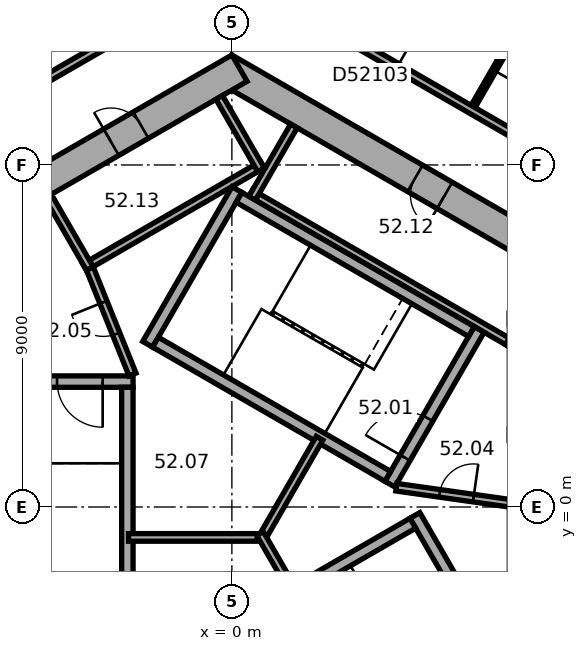
"""IFC4 building model, lengths in metres.
Left out: names, types, materials, properties, quantities, classifications, styles, units other than length and angle.
Written with IfcOpenShell. Run it as: python <this file> out.ifc"""

import sys

from ifc_helpers import new_model, si_unit, direction, frame, frame_2d, origin, place, context, subcontext, project, spatial, rectangle, extrude, element, fill, save


model = new_model("IFC4")
c1 = context("Model", 3, precision=1e-05, world=origin(), true_north=direction((0.0, 1.0)))
c2 = subcontext(c1, "Body", "Model", "MODEL_VIEW")
j1 = project(units=[si_unit("LENGTHUNIT", "METRE"), si_unit("PLANEANGLEUNIT", "RADIAN")], contexts=[c1])
p1 = place(None, origin())
s1 = spatial("IfcSite", under=j1, at=p1, CompositionType="ELEMENT")
p2 = place(p1, origin())
s2 = spatial("IfcBuilding", under=s1, at=p2, CompositionType="ELEMENT")
p3 = place(p2, frame((0.0, 0.0, 210.6)))
s3 = spatial("IfcBuildingStorey", under=s2, at=p3, CompositionType="ELEMENT", Elevation=210.6)
p4 = place(p3, frame((10.1, 5.6, 0.0), z_axis=(0.0, 0.0, 1.0), x_axis=(-0.866023897231, 0.500002609418, 0.0)))
e1 = element("IfcWall", 1, at=p4, inside=s3, PredefinedType="SHEAR", context=c2, shape_type="SweptSolid", body=[
    extrude(rectangle(XDim=11.894, YDim=0.8, at=frame_2d((5.947, 0.0))), origin(), (0.0, 0.0, 1.0), 3.7),
])
p5 = place(p4, frame((5.197, 0.0, 0.0)))
e2 = element("IfcOpeningElement", 2, at=p5, cuts=e1, PredefinedType="OPENING", context=c2, shape_type="SweptSolid", body=[
    extrude(rectangle(XDim=0.9, YDim=2.1, at=frame_2d((0.45, 1.05))), frame((0.0, 0.41, 0.0), z_axis=(0.0, -1.0, 0.0), x_axis=(1.0, 0.0, 0.0)), (0.0, 0.0, 1.0), 0.82),
])
p6 = place(p3, frame((0.2, 11.547, 0.0), z_axis=(0.0, 0.0, 1.0), x_axis=(-0.866023897231, -0.500002609418, 0.0)))
e3 = element("IfcWall", 3, at=p6, inside=s3, PredefinedType="SHEAR", context=c2, shape_type="SweptSolid", body=[
    extrude(rectangle(XDim=11.894, YDim=0.8, at=frame_2d((5.947, 0.0))), origin(), (0.0, 0.0, 1.0), 3.7),
])
p7 = place(p6, frame((6.147, 0.0, 0.0)))
e4 = element("IfcOpeningElement", 4, at=p7, cuts=e3, PredefinedType="OPENING", context=c2, shape_type="SweptSolid", body=[
    extrude(rectangle(XDim=1.5, YDim=2.1, at=frame_2d((0.75, 1.05))), frame((0.0, 0.41, 0.0), z_axis=(0.0, -1.0, 0.0), x_axis=(1.0, 0.0, 0.0)), (0.0, 0.0, 1.0), 0.82),
])
p8 = place(p6, frame((2.997, 0.0, 0.0)))
e5 = element("IfcOpeningElement", 5, at=p8, cuts=e3, PredefinedType="OPENING", context=c2, shape_type="SweptSolid", body=[
    extrude(rectangle(XDim=0.9, YDim=2.1, at=frame_2d((0.45, 1.05))), frame((0.0, 0.41, 0.0), z_axis=(0.0, -1.0, 0.0), x_axis=(1.0, 0.0, 0.0)), (0.0, 0.0, 1.0), 0.82),
])
p9 = place(p3, frame((7.424, 4.259, 0.0), z_axis=(0.0, 0.0, 1.0), x_axis=(-0.866026010844, 0.49999894854, 0.0)))
e6 = element("IfcWall", 6, at=p9, inside=s3, PredefinedType="PARTITIONING", context=c2, shape_type="SweptSolid", body=[
    extrude(rectangle(XDim=8.0, YDim=0.2, at=frame_2d((4.0, 0.0))), origin(), (0.0, 0.0, 1.0), 3.35),
])
for number, where, z_axis, x_axis in (
    (7, (7.287, 4.222, 0.0), (0.0, 0.0, 1.0), (0.5, 0.866, 0.0)),
    (8, (0.532, 8.122, 0.0), (0.0, 0.0, 1.0), (0.5, 0.866, 0.0)),
):
    element("IfcWall", number, at=place(p3, frame(where, z_axis=z_axis, x_axis=x_axis)), inside=s3, PredefinedType="PARTITIONING", context=c2, shape_type="SweptSolid", body=[
        extrude(rectangle(XDim=2.2, YDim=0.2, at=frame_2d((1.1, 0.0))), origin(), (0.0, 0.0, 1.0), 3.35),
    ])
p10 = place(p3, frame((0.803, 9.009, 0.0), z_axis=(0.0, 0.0, 1.0), x_axis=(-0.866028230842, -0.499995103361, 0.0)))
e9 = element("IfcWall", 9, at=p10, inside=s3, PredefinedType="PARTITIONING", context=c2, shape_type="SweptSolid", body=[
    extrude(rectangle(XDim=5.4, YDim=0.2, at=frame_2d((2.7, 0.0))), origin(), (0.0, 0.0, 1.0), 3.35),
])
p11 = place(p3, frame((0.767, 8.872, 0.0), z_axis=(0.0, 0.0, 1.0), x_axis=(-0.499994660107, 0.866028486751, 0.0)))
e10 = element("IfcWall", 10, at=p11, inside=s3, PredefinedType="PARTITIONING", context=c2, shape_type="SweptSolid", body=[
    extrude(rectangle(XDim=2.2, YDim=0.2, at=frame_2d((1.1, 0.0))), origin(), (0.0, 0.0, 1.0), 3.35),
])
p12 = place(p3, frame((-3.737, 6.272, 0.0), z_axis=(0.0, 0.0, 1.0), x_axis=(-0.50002983664, 0.866008176907, 0.0)))
e11 = element("IfcWall", 11, at=p12, inside=s3, PredefinedType="PARTITIONING", context=c2, shape_type="SweptSolid", body=[
    extrude(rectangle(XDim=2.2, YDim=0.2, at=frame_2d((1.1, 0.0))), origin(), (0.0, 0.0, 1.0), 3.35),
])
p13 = place(p3, frame((4.158, 0.602, 0.0), z_axis=(0.0, 0.0, 1.0), x_axis=(0.499977259774, 0.866038532462, 0.0)))
e12 = element("IfcWall", 12, at=p13, inside=s3, PredefinedType="SHEAR", context=c2, shape_type="SweptSolid", body=[
    extrude(rectangle(XDim=4.7, YDim=0.3, at=frame_2d((2.35, 0.0))), origin(), (0.0, 0.0, 1.0), 3.35),
])
p14 = place(p13, frame((0.8, 0.0, 0.0)))
e13 = element("IfcOpeningElement", 13, at=p14, cuts=e12, PredefinedType="OPENING", context=c2, shape_type="SweptSolid", body=[
    extrude(rectangle(XDim=1.2, YDim=2.1, at=frame_2d((0.6, 1.05))), frame((0.0, 0.16, 0.0), z_axis=(0.0, -1.0, 0.0), x_axis=(1.0, 0.0, 0.0)), (0.0, 0.0, 1.0), 0.32),
])
p15 = place(p3, frame((-2.216, 4.282, 0.0), z_axis=(0.0, 0.0, 1.0), x_axis=(0.499977259774, 0.866038532462, 0.0)))
e14 = element("IfcWall", 14, at=p15, inside=s3, PredefinedType="SHEAR", context=c2, shape_type="SweptSolid", body=[
    extrude(rectangle(XDim=4.7, YDim=0.3, at=frame_2d((2.35, 0.0))), origin(), (0.0, 0.0, 1.0), 3.35),
])
for number, where, z_axis, x_axis in (
    (15, (4.103, 0.807, 0.0), (0.0, 0.0, 1.0), (-0.866, 0.5, 0.0)),
    (16, (6.303, 4.617, 0.0), (0.0, 0.0, 1.0), (-0.866, 0.5, 0.0)),
):
    element("IfcWall", number, at=place(p3, frame(where, z_axis=z_axis, x_axis=x_axis)), inside=s3, PredefinedType="SHEAR", context=c2, shape_type="SweptSolid", body=[
        extrude(rectangle(XDim=7.06, YDim=0.3, at=frame_2d((3.53, 0.0))), origin(), (0.0, 0.0, 1.0), 3.35),
    ])
p16 = place(p3, frame((-2.6, 3.3, 0.0), z_axis=(0.0, 0.0, 1.0), x_axis=(-1.0, 0.0, 0.0)))
e17 = element("IfcWall", 17, at=p16, inside=s3, PredefinedType="SHEAR", context=c2, shape_type="SweptSolid", body=[
    extrude(rectangle(XDim=4.7, YDim=0.3, at=frame_2d((2.35, 0.0))), origin(), (0.0, 0.0, 1.0), 3.35),
])
p17 = place(p16, frame((0.8, 0.0, 0.0)))
e18 = element("IfcOpeningElement", 18, at=p17, cuts=e17, PredefinedType="OPENING", context=c2, shape_type="SweptSolid", body=[
    extrude(rectangle(XDim=1.2, YDim=2.1, at=frame_2d((0.6, 1.05))), frame((0.0, 0.16, 0.0), z_axis=(0.0, -1.0, 0.0), x_axis=(1.0, 0.0, 0.0)), (0.0, 0.0, 1.0), 0.32),
])
p18 = place(p3, frame((-2.75, 3.15, 0.0), z_axis=(0.0, 0.0, 1.0), x_axis=(0.0, -1.0, 0.0)))
e19 = element("IfcWall", 19, at=p18, inside=s3, PredefinedType="SHEAR", context=c2, shape_type="SweptSolid", body=[
    extrude(rectangle(XDim=7.06, YDim=0.3, at=frame_2d((3.53, 0.0))), origin(), (0.0, 0.0, 1.0), 3.35),
])
p19 = place(p3, frame((4.816, -0.222, 0.0), z_axis=(0.0, 0.0, 1.0), x_axis=(0.499977259774, -0.866038532462, 0.0)))
e20 = element("IfcWall", 20, at=p19, inside=s3, PredefinedType="SHEAR", context=c2, shape_type="SweptSolid", body=[
    extrude(rectangle(XDim=4.7, YDim=0.3, at=frame_2d((2.35, 0.0))), origin(), (0.0, 0.0, 1.0), 3.35),
])
p20 = place(p3, frame((-1.353, -3.957, 0.0), z_axis=(0.0, 0.0, 1.0), x_axis=(0.866027801685, 0.499995846692, 0.0)))
e21 = element("IfcWall", 21, at=p20, inside=s3, PredefinedType="SHEAR", context=c2, shape_type="SweptSolid", body=[
    extrude(rectangle(XDim=7.06, YDim=0.3, at=frame_2d((3.53, 0.0))), origin(), (0.0, 0.0, 1.0), 3.35),
])
p21 = place(p3, frame((4.327, 0.521, 0.0), z_axis=(0.0, 0.0, 1.0), x_axis=(0.990124376366, -0.14019172346, 0.0)))
e22 = element("IfcWall", 22, at=p21, inside=s3, PredefinedType="PARTITIONING", context=c2, shape_type="SweptSolid", body=[
    extrude(rectangle(XDim=3.002, YDim=0.2, at=frame_2d((1.501, 0.0))), origin(), (0.0, 0.0, 1.0), 3.35),
])
p22 = place(p21, frame((1.15, 0.0, 0.0)))
e23 = element("IfcOpeningElement", 23, at=p22, cuts=e22, PredefinedType="OPENING", context=c2, shape_type="SweptSolid", body=[
    extrude(rectangle(XDim=0.9, YDim=2.1, at=frame_2d((0.45, 1.05))), frame((0.0, 0.11, 0.0), z_axis=(0.0, -1.0, 0.0), x_axis=(1.0, 0.0, 0.0)), (0.0, 0.0, 1.0), 0.22),
])
p23 = place(p3, frame((-2.615, 3.487, 0.0), z_axis=(0.0, 0.0, 1.0), x_axis=(-0.373576831041, 0.92759924068, 0.0)))
e24 = element("IfcWall", 24, at=p23, inside=s3, PredefinedType="PARTITIONING", context=c2, shape_type="SweptSolid", body=[
    extrude(rectangle(XDim=3.002, YDim=0.2, at=frame_2d((1.501, 0.0))), origin(), (0.0, 0.0, 1.0), 3.35),
])
p24 = place(p23, frame((1.15, 0.0, 0.0)))
e25 = element("IfcOpeningElement", 25, at=p24, cuts=e24, PredefinedType="OPENING", context=c2, shape_type="SweptSolid", body=[
    extrude(rectangle(XDim=0.9, YDim=2.1, at=frame_2d((0.45, 1.05))), frame((0.0, 0.11, 0.0), z_axis=(0.0, -1.0, 0.0), x_axis=(1.0, 0.0, 0.0)), (0.0, 0.0, 1.0), 0.22),
])
p25 = place(p3, frame((0.92, -0.8, 0.0), z_axis=(0.0, 0.0, 1.0), x_axis=(-1.0, 0.0, 0.0)))
e26 = element("IfcWall", 26, at=p25, inside=s3, PredefinedType="PARTITIONING", context=c2, shape_type="SweptSolid", body=[
    extrude(rectangle(XDim=3.64, YDim=0.2, at=frame_2d((1.82, 0.0))), origin(), (0.0, 0.0, 1.0), 3.35),
])
p26 = place(p3, frame((0.74, -0.904, 0.0), z_axis=(0.0, 0.0, 1.0), x_axis=(0.500028278809, 0.866009076391, 0.0)))
e27 = element("IfcWall", 27, at=p26, inside=s3, PredefinedType="PARTITIONING", context=c2, shape_type="SweptSolid", body=[
    extrude(rectangle(XDim=3.133, YDim=0.2, at=frame_2d((1.566, 0.0))), origin(), (0.0, 0.0, 1.0), 3.35),
])
p27 = place(p3, frame((0.74, -0.696, 0.0), z_axis=(0.0, 0.0, 1.0), x_axis=(0.499956301907, -0.86605063142, 0.0)))
e28 = element("IfcWall", 28, at=p27, inside=s3, PredefinedType="PARTITIONING", context=c2, shape_type="SweptSolid", body=[
    extrude(rectangle(XDim=1.747, YDim=0.2, at=frame_2d((0.874, 0.0))), origin(), (0.0, 0.0, 1.0), 3.35),
])
p28 = place(p3, frame((-1.167, 13.414, 0.0), z_axis=(0.0, 0.0, 1.0), x_axis=(-0.866023347809, -0.500003561037, 0.0)))
e29 = element("IfcWall", 29, at=p28, inside=s3, PredefinedType="PARTITIONING", context=c2, shape_type="SweptSolid", body=[
    extrude(rectangle(XDim=4.661, YDim=0.2, at=frame_2d((2.331, 0.0))), origin(), (0.0, 0.0, 1.0), 3.35),
])
p29 = place(p3, frame((6.347, 10.539, 0.0), z_axis=(0.0, 0.0, 1.0), x_axis=(0.499933790963, 0.866063626216, 0.0)))
e30 = element("IfcWall", 30, at=p29, inside=s3, PredefinedType="PARTITIONING", context=c2, shape_type="SweptSolid", body=[
    extrude(rectangle(XDim=3.1, YDim=0.12, at=frame_2d((1.55, 0.0))), origin(), (0.0, 0.0, 1.0), 3.35),
])
p30 = place(p29, frame((1.1, 0.0, 0.0)))
e31 = element("IfcOpeningElement", 31, at=p30, cuts=e30, PredefinedType="OPENING", context=c2, shape_type="SweptSolid", body=[
    extrude(rectangle(XDim=0.9, YDim=2.1, at=frame_2d((0.45, 1.05))), frame((0.0, 0.07, 0.0), z_axis=(0.0, -1.0, 0.0), x_axis=(1.0, 0.0, 0.0)), (0.0, 0.0, 1.0), 0.14),
])
p31 = place(p3, frame((8.721, 9.052, 0.0), z_axis=(0.0, 0.0, 1.0), x_axis=(-0.866028125821, 0.499995285264, 0.0)))
e32 = element("IfcWall", 32, at=p31, inside=s3, PredefinedType="PARTITIONING", context=c2, shape_type="SweptSolid", body=[
    extrude(rectangle(XDim=8.934, YDim=0.2, at=frame_2d((4.467, 0.0))), origin(), (0.0, 0.0, 1.0), 3.35),
])
p32 = place(p31, frame((5.05, 0.0, 0.0)))
e33 = element("IfcOpeningElement", 33, at=p32, cuts=e32, PredefinedType="OPENING", context=c2, shape_type="SweptSolid", body=[
    extrude(rectangle(XDim=1.0, YDim=2.1, at=frame_2d((0.5, 1.05))), frame((0.0, 0.11, 0.0), z_axis=(0.0, -1.0, 0.0), x_axis=(1.0, 0.0, 0.0)), (0.0, 0.0, 1.0), 0.22),
])
p33 = place(p14, origin())
e34 = element("IfcDoor", 34, at=p33, inside=s3, OperationType="SINGLE_SWING_RIGHT", PredefinedType="DOOR", context=c2, shape_type="SweptSolid", body=[
    extrude(rectangle(XDim=1.2, YDim=2.1, at=frame_2d((0.6, 1.05))), frame((0.0, 0.025, 0.0), z_axis=(0.0, -1.0, 0.0), x_axis=(1.0, 0.0, 0.0)), (0.0, 0.0, 1.0), 0.05),
])
fill(e13, e34)
p34 = place(p17, origin())
e35 = element("IfcDoor", 35, at=p34, inside=s3, OperationType="SINGLE_SWING_RIGHT", PredefinedType="DOOR", context=c2, shape_type="SweptSolid", body=[
    extrude(rectangle(XDim=1.2, YDim=2.1, at=frame_2d((0.6, 1.05))), frame((0.0, 0.025, 0.0), z_axis=(0.0, -1.0, 0.0), x_axis=(1.0, 0.0, 0.0)), (0.0, 0.0, 1.0), 0.05),
])
fill(e18, e35)
p35 = place(p22, origin())
e36 = element("IfcDoor", 36, at=p35, inside=s3, OperationType="SINGLE_SWING_LEFT", PredefinedType="DOOR", context=c2, shape_type="SweptSolid", body=[
    extrude(rectangle(XDim=0.9, YDim=2.1, at=frame_2d((0.45, 1.05))), frame((0.0, 0.025, 0.0), z_axis=(0.0, -1.0, 0.0), x_axis=(1.0, 0.0, 0.0)), (0.0, 0.0, 1.0), 0.05),
])
fill(e23, e36)
p36 = place(p24, origin())
e37 = element("IfcDoor", 37, at=p36, inside=s3, OperationType="SINGLE_SWING_LEFT", PredefinedType="DOOR", context=c2, shape_type="SweptSolid", body=[
    extrude(rectangle(XDim=0.9, YDim=2.1, at=frame_2d((0.45, 1.05))), frame((0.0, 0.025, 0.0), z_axis=(0.0, -1.0, 0.0), x_axis=(1.0, 0.0, 0.0)), (0.0, 0.0, 1.0), 0.05),
])
fill(e25, e37)
p37 = place(p5, origin())
e38 = element("IfcDoor", 38, at=p37, inside=s3, OperationType="SINGLE_SWING_LEFT", PredefinedType="DOOR", context=c2, shape_type="SweptSolid", body=[
    extrude(rectangle(XDim=0.9, YDim=2.1, at=frame_2d((0.45, 1.05))), frame((0.0, 0.025, 0.0), z_axis=(0.0, -1.0, 0.0), x_axis=(1.0, 0.0, 0.0)), (0.0, 0.0, 1.0), 0.05),
])
fill(e2, e38)
p38 = place(p8, origin())
e39 = element("IfcDoor", 39, at=p38, inside=s3, OperationType="SINGLE_SWING_LEFT", PredefinedType="DOOR", context=c2, shape_type="SweptSolid", body=[
    extrude(rectangle(XDim=0.9, YDim=2.1, at=frame_2d((0.45, 1.05))), frame((0.0, 0.025, 0.0), z_axis=(0.0, -1.0, 0.0), x_axis=(1.0, 0.0, 0.0)), (0.0, 0.0, 1.0), 0.05),
])
fill(e5, e39)
p39 = place(p32, origin())
e40 = element("IfcDoor", 40, at=p39, inside=s3, OperationType="SINGLE_SWING_LEFT", PredefinedType="DOOR", context=c2, shape_type="SweptSolid", body=[
    extrude(rectangle(XDim=1.0, YDim=2.1, at=frame_2d((0.5, 1.05))), frame((0.0, 0.025, 0.0), z_axis=(0.0, -1.0, 0.0), x_axis=(1.0, 0.0, 0.0)), (0.0, 0.0, 1.0), 0.05),
])
fill(e33, e40)
p40 = place(p30, origin())
e41 = element("IfcDoor", 41, at=p40, inside=s3, OperationType="SINGLE_SWING_LEFT", PredefinedType="DOOR", context=c2, shape_type="SweptSolid", body=[
    extrude(rectangle(XDim=0.9, YDim=2.1, at=frame_2d((0.45, 1.05))), frame((0.0, 0.025, 0.0), z_axis=(0.0, -1.0, 0.0), x_axis=(1.0, 0.0, 0.0)), (0.0, 0.0, 1.0), 0.05),
])
fill(e31, e41)
save(model, sys.argv[1])
